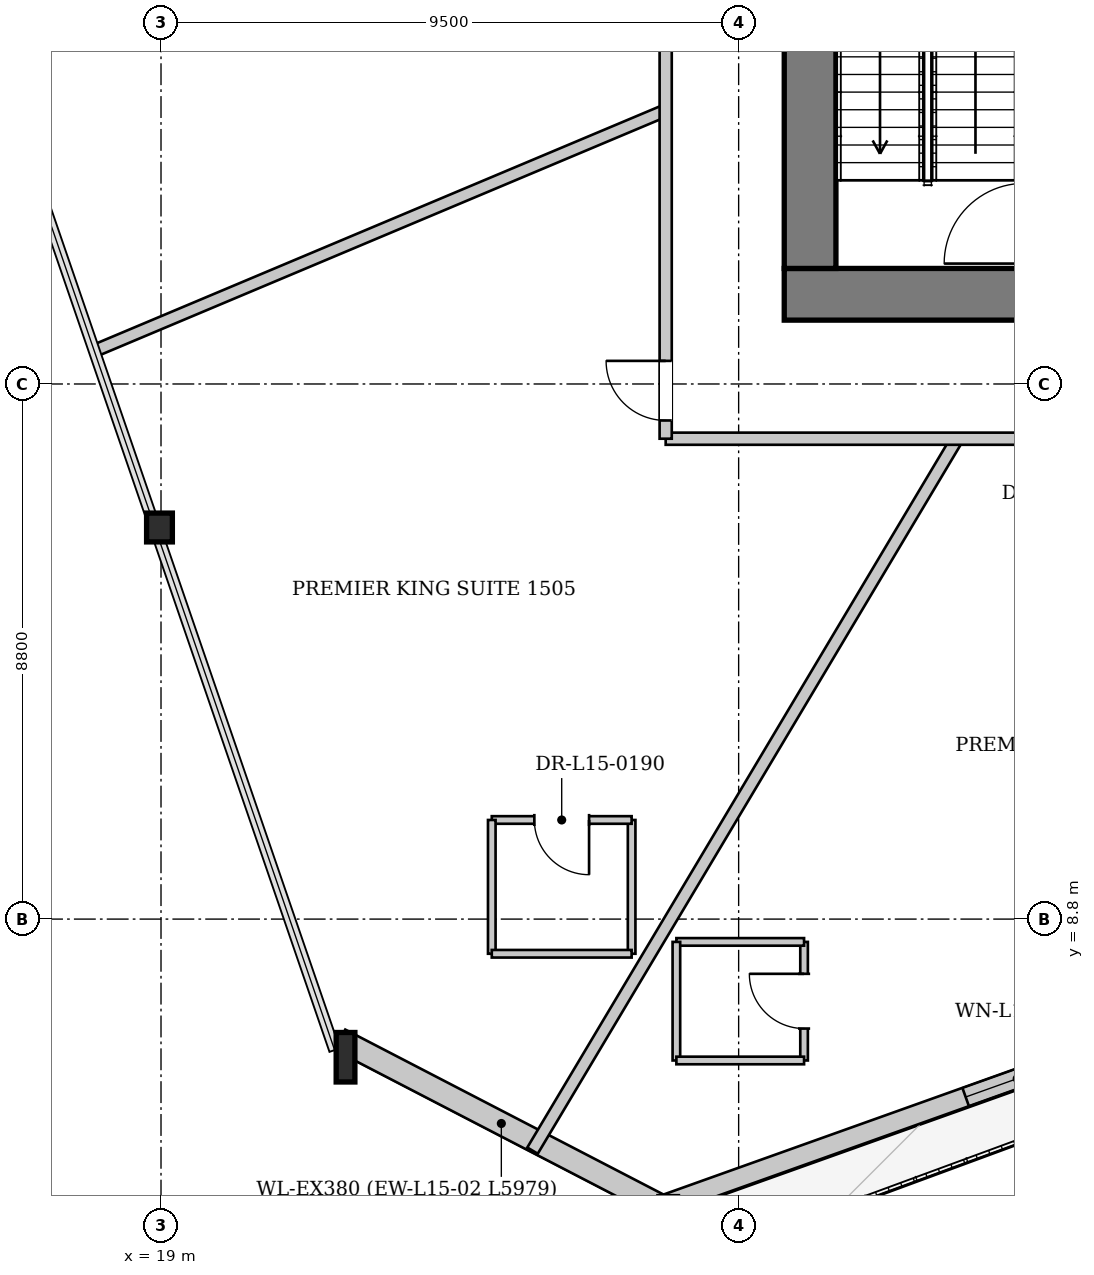
"""IFC4 building model, lengths in metres.
Left out: names, types, materials, properties, quantities, classifications, styles, units other than length and angle.
Written with IfcOpenShell. Run it as: python <this file> out.ifc"""

import sys

from ifc_helpers import new_model, si_unit, direction, frame, frame_2d, origin, origin_2d, place, context, subcontext, project, spatial, rectangle, i_section, extrude, source, transform, mapped, element, fill, save


model = new_model("IFC4")
c1 = context("Model", 3, precision=1e-05, world=origin(), true_north=direction((0.0, 1.0)))
c2 = subcontext(c1, "Body", "Model", "MODEL_VIEW")
j1 = project(units=[si_unit("LENGTHUNIT", "METRE"), si_unit("PLANEANGLEUNIT", "RADIAN")], contexts=[c1])
p1 = place(None, origin())
s1 = spatial("IfcSite", under=j1, at=p1, CompositionType="ELEMENT")
p2 = place(p1, origin())
s2 = spatial("IfcBuilding", under=s1, at=p2, CompositionType="ELEMENT")
p3 = place(p2, frame((0.0, 0.0, 61.25)))
s3 = spatial("IfcBuildingStorey", under=s2, at=p3, CompositionType="ELEMENT", Elevation=61.25)
m1 = source(origin(), c2, "Body", "SweptSolid", [
    extrude(i_section(OverallWidth=0.424, OverallDepth=0.474, WebThickness=0.043, FlangeThickness=0.068, at=origin_2d()), origin(), (0.0, 0.0, 1.0), 3.406),
])
p4 = place(p3, frame((18.852, 15.383, 0.0), z_axis=(0.072396399294, -0.083936815419, 0.993837699218), x_axis=(0.757244521665, 0.653131483247, 0.0)))
e1 = element("IfcColumn", 1, at=p4, inside=s3, PredefinedType="COLUMN", context=c2, shape_type="MappedRepresentation", body=[
    mapped(m1, transform((0.0, 0.0, 0.0), x_axis=(1.0, 0.0, 0.0), y_axis=(0.0, 1.0, 0.0), z_axis=(0.0, 0.0, 1.0), scale=1.0)),
])
m2 = source(origin(), c2, "Body", "SweptSolid", [
    extrude(i_section(OverallWidth=0.308, OverallDepth=0.814, WebThickness=0.021, FlangeThickness=0.04, at=origin_2d()), origin(), (0.0, 0.0, 1.0), 3.412),
])
p5 = place(p3, frame((21.856, 6.646, 0.0), z_axis=(0.104897816751, -0.068906273896, 0.992092925818), x_axis=(0.549029983711, 0.835802654331, 0.0)))
e2 = element("IfcColumn", 2, at=p5, inside=s3, PredefinedType="COLUMN", context=c2, shape_type="MappedRepresentation", body=[
    mapped(m2, transform((0.0, 0.0, 0.0), x_axis=(1.0, 0.0, 0.0), y_axis=(0.0, 1.0, 0.0), z_axis=(0.0, 0.0, 1.0), scale=1.0)),
])
p6 = place(p3, frame((50.076, 12.243, 0.0), z_axis=(0.0, 0.0, 1.0), x_axis=(-0.941799205237, -0.33617593164, 0.0)))
e3 = element("IfcWall", 3, at=p6, inside=s3, PredefinedType="SOLIDWALL", context=c2, shape_type="SweptSolid", body=[
    extrude(rectangle(XDim=24.385, YDim=0.32, at=frame_2d((12.193, 0.0))), origin(), (0.0, 0.0, 1.0), 2.592),
])
p7 = place(p6, frame((7.253, 0.0, 0.0)))
e4 = element("IfcOpeningElement", 4, at=p7, cuts=e3, PredefinedType="OPENING", context=c2, shape_type="SweptSolid", body=[
    extrude(rectangle(XDim=1.1, YDim=2.3, at=frame_2d((0.55, 1.15))), frame((0.0, 0.17, 0.0), z_axis=(0.0, -1.0, 0.0), x_axis=(1.0, 0.0, 0.0)), (0.0, 0.0, 1.0), 0.34),
])
p8 = place(p6, frame((17.145, 0.0, 0.272)))
e5 = element("IfcOpeningElement", 5, at=p8, cuts=e3, PredefinedType="OPENING", context=c2, shape_type="SweptSolid", body=[
    extrude(rectangle(XDim=1.8, YDim=2.2, at=frame_2d((0.9, 1.1))), frame((0.0, 0.17, 0.0), z_axis=(0.0, -1.0, 0.0), x_axis=(1.0, 0.0, 0.0)), (0.0, 0.0, 1.0), 0.34),
])
p9 = place(p3, frame((27.251, 4.063, 0.0), z_axis=(0.0, 0.0, 1.0), x_axis=(-0.887815090673, 0.46020035286, 0.0)))
e6 = element("IfcWall", 6, at=p9, inside=s3, PredefinedType="SOLIDWALL", context=c2, shape_type="SweptSolid", body=[
    extrude(rectangle(XDim=5.979, YDim=0.38, at=frame_2d((2.989, 0.0))), origin(), (0.0, 0.0, 1.0), 2.592),
])
p10 = place(p3, frame((46.75, 19.075, 0.0), z_axis=(0.0, 0.0, 1.0), x_axis=(-1.0, 0.0, 0.0)))
e7 = element("IfcWall", 7, at=p10, inside=s3, PredefinedType="SHEAR", context=c2, shape_type="SweptSolid", body=[
    extrude(rectangle(XDim=17.5, YDim=0.85, at=frame_2d((8.75, 0.0))), origin(), (0.0, 0.0, 1.0), 3.3),
])
p11 = place(p10, frame((4.95, 0.0, 0.0)))
e8 = element("IfcOpeningElement", 8, at=p11, cuts=e7, PredefinedType="OPENING", context=c2, shape_type="SweptSolid", body=[
    extrude(rectangle(XDim=1.12, YDim=2.25, at=frame_2d((0.56, 1.125))), frame((0.0, 0.435, 0.0), z_axis=(0.0, -1.0, 0.0), x_axis=(1.0, 0.0, 0.0)), (0.0, 0.0, 1.0), 0.87),
])
p12 = place(p10, frame((11.45, 0.0, 0.0)))
e9 = element("IfcOpeningElement", 9, at=p12, cuts=e7, PredefinedType="OPENING", context=c2, shape_type="SweptSolid", body=[
    extrude(rectangle(XDim=1.12, YDim=2.25, at=frame_2d((0.56, 1.125))), frame((0.0, 0.435, 0.0), z_axis=(0.0, -1.0, 0.0), x_axis=(1.0, 0.0, 0.0)), (0.0, 0.0, 1.0), 0.87),
])
p13 = place(p3, frame((29.675, 19.5, 0.0), z_axis=(0.0, 0.0, 1.0), x_axis=(0.0, 1.0, 0.0)))
e10 = element("IfcWall", 10, at=p13, inside=s3, PredefinedType="SHEAR", context=c2, shape_type="SweptSolid", body=[
    extrude(rectangle(XDim=14.2, YDim=0.85, at=frame_2d((7.1, 0.0))), origin(), (0.0, 0.0, 1.0), 3.3),
])
p14 = place(p13, frame((7.42, 0.0, 0.0)))
e11 = element("IfcOpeningElement", 11, at=p14, cuts=e10, PredefinedType="OPENING", context=c2, shape_type="SweptSolid", body=[
    extrude(rectangle(XDim=1.6, YDim=2.2, at=frame_2d((0.8, 1.1))), frame((0.0, 0.435, 0.0), z_axis=(0.0, -1.0, 0.0), x_axis=(1.0, 0.0, 0.0)), (0.0, 0.0, 1.0), 0.87),
])
p15 = place(p3, frame((27.3, 22.098, 0.0), z_axis=(0.0, 0.0, 1.0), x_axis=(-0.921738414134, -0.387812191543, 0.0)))
e12 = element("IfcWall", 12, at=p15, inside=s3, PredefinedType="PARTITIONING", context=c2, shape_type="SweptSolid", body=[
    extrude(rectangle(XDim=10.166, YDim=0.2, at=frame_2d((5.083, 0.0))), origin(), (0.0, 0.0, 1.0), 3.3),
])
p16 = place(p3, frame((32.094, 16.7, 0.0), z_axis=(0.0, 0.0, 1.0), x_axis=(-0.512323953294, -0.858792272253, 0.0)))
e13 = element("IfcWall", 13, at=p16, inside=s3, PredefinedType="PARTITIONING", context=c2, shape_type="SweptSolid", body=[
    extrude(rectangle(XDim=13.632, YDim=0.2, at=frame_2d((6.816, 0.0))), origin(), (0.0, 0.0, 1.0), 3.3),
])
p17 = place(p3, frame((26.74, 8.23, 0.0), z_axis=(0.0, 0.0, 1.0), x_axis=(0.0, 1.0, 0.0)))
e14 = element("IfcWall", 14, at=p17, inside=s3, PredefinedType="PARTITIONING", context=c2, shape_type="SweptSolid", body=[
    extrude(rectangle(XDim=2.2, YDim=0.125, at=frame_2d((1.1, 0.0))), origin(), (0.0, 0.0, 1.0), 3.3),
])
p18 = place(p3, frame((26.74, 10.43, 0.0), z_axis=(0.0, 0.0, 1.0), x_axis=(-1.0, 0.0, 0.0)))
e15 = element("IfcWall", 15, at=p18, inside=s3, PredefinedType="PARTITIONING", context=c2, shape_type="SweptSolid", body=[
    extrude(rectangle(XDim=2.3, YDim=0.125, at=frame_2d((1.15, 0.0))), origin(), (0.0, 0.0, 1.0), 3.3),
])
p19 = place(p18, frame((0.7, 0.0, 0.0)))
e16 = element("IfcOpeningElement", 16, at=p19, cuts=e15, PredefinedType="OPENING", context=c2, shape_type="SweptSolid", body=[
    extrude(rectangle(XDim=0.9, YDim=2.1, at=frame_2d((0.45, 1.05))), frame((0.0, 0.073, 0.0), z_axis=(0.0, -1.0, 0.0), x_axis=(1.0, 0.0, 0.0)), (0.0, 0.0, 1.0), 0.145),
])
p20 = place(p3, frame((24.44, 10.43, 0.0), z_axis=(0.0, 0.0, 1.0), x_axis=(0.0, -1.0, 0.0)))
e17 = element("IfcWall", 17, at=p20, inside=s3, PredefinedType="PARTITIONING", context=c2, shape_type="SweptSolid", body=[
    extrude(rectangle(XDim=2.2, YDim=0.125, at=frame_2d((1.1, 0.0))), origin(), (0.0, 0.0, 1.0), 3.3),
])
p21 = place(p3, frame((24.44, 8.23, 0.0), z_axis=(0.0, 0.0, 1.0), x_axis=(1.0, 0.0, 0.0)))
e18 = element("IfcWall", 18, at=p21, inside=s3, PredefinedType="PARTITIONING", context=c2, shape_type="SweptSolid", body=[
    extrude(rectangle(XDim=2.3, YDim=0.125, at=frame_2d((1.15, 0.0))), origin(), (0.0, 0.0, 1.0), 3.3),
])
p22 = place(p3, frame((29.576, 6.475, 0.0), z_axis=(0.0, 0.0, 1.0), x_axis=(0.0, 1.0, 0.0)))
e19 = element("IfcWall", 19, at=p22, inside=s3, PredefinedType="PARTITIONING", context=c2, shape_type="SweptSolid", body=[
    extrude(rectangle(XDim=1.95, YDim=0.125, at=frame_2d((0.975, 0.0))), origin(), (0.0, 0.0, 1.0), 2.795),
])
p23 = place(p22, frame((0.525, 0.0, 0.0)))
e20 = element("IfcOpeningElement", 20, at=p23, cuts=e19, PredefinedType="OPENING", context=c2, shape_type="SweptSolid", body=[
    extrude(rectangle(XDim=0.9, YDim=2.1, at=frame_2d((0.45, 1.05))), frame((0.0, 0.073, 0.0), z_axis=(0.0, -1.0, 0.0), x_axis=(1.0, 0.0, 0.0)), (0.0, 0.0, 1.0), 0.145),
])
p24 = place(p3, frame((29.576, 8.425, 0.0), z_axis=(0.0, 0.0, 1.0), x_axis=(-1.0, 0.0, 0.0)))
e21 = element("IfcWall", 21, at=p24, inside=s3, PredefinedType="PARTITIONING", context=c2, shape_type="SweptSolid", body=[
    extrude(rectangle(XDim=2.1, YDim=0.125, at=frame_2d((1.05, 0.0))), origin(), (0.0, 0.0, 1.0), 3.3),
])
p25 = place(p3, frame((27.476, 8.425, 0.0), z_axis=(0.0, 0.0, 1.0), x_axis=(0.0, -1.0, 0.0)))
e22 = element("IfcWall", 22, at=p25, inside=s3, PredefinedType="PARTITIONING", context=c2, shape_type="SweptSolid", body=[
    extrude(rectangle(XDim=1.95, YDim=0.125, at=frame_2d((0.975, 0.0))), origin(), (0.0, 0.0, 1.0), 3.3),
])
p26 = place(p3, frame((27.476, 6.475, 0.0), z_axis=(0.0, 0.0, 1.0), x_axis=(1.0, 0.0, 0.0)))
e23 = element("IfcWall", 23, at=p26, inside=s3, PredefinedType="PARTITIONING", context=c2, shape_type="SweptSolid", body=[
    extrude(rectangle(XDim=2.1, YDim=0.125, at=frame_2d((1.05, 0.0))), origin(), (0.0, 0.0, 1.0), 3.3),
])
p27 = place(p3, frame((27.3, 16.7, 0.0), z_axis=(0.0, 0.0, 1.0), x_axis=(1.0, 0.0, 0.0)))
e24 = element("IfcWall", 24, at=p27, inside=s3, PredefinedType="PARTITIONING", context=c2, shape_type="SweptSolid", body=[
    extrude(rectangle(XDim=21.4, YDim=0.2, at=frame_2d((10.7, 0.0))), origin(), (0.0, 0.0, 1.0), 3.3),
])
p28 = place(p27, frame((6.732, 0.0, 0.0)))
e25 = element("IfcOpeningElement", 25, at=p28, cuts=e24, PredefinedType="OPENING", context=c2, shape_type="SweptSolid", body=[
    extrude(rectangle(XDim=0.98, YDim=2.15, at=frame_2d((0.49, 1.075))), frame((0.0, 0.11, 0.0), z_axis=(0.0, -1.0, 0.0), x_axis=(1.0, 0.0, 0.0)), (0.0, 0.0, 1.0), 0.22),
])
p29 = place(p27, frame((17.714, 0.0, 0.0)))
e26 = element("IfcOpeningElement", 26, at=p29, cuts=e24, PredefinedType="OPENING", context=c2, shape_type="SweptSolid", body=[
    extrude(rectangle(XDim=0.98, YDim=2.15, at=frame_2d((0.49, 1.075))), frame((0.0, 0.11, 0.0), z_axis=(0.0, -1.0, 0.0), x_axis=(1.0, 0.0, 0.0)), (0.0, 0.0, 1.0), 0.22),
])
p30 = place(p3, frame((27.3, 16.7, 0.0), z_axis=(0.0, 0.0, 1.0), x_axis=(0.0, 1.0, 0.0)))
e27 = element("IfcWall", 27, at=p30, inside=s3, PredefinedType="PARTITIONING", context=c2, shape_type="SweptSolid", body=[
    extrude(rectangle(XDim=19.8, YDim=0.2, at=frame_2d((9.9, 0.0))), origin(), (0.0, 0.0, 1.0), 3.3),
])
p31 = place(p30, frame((18.52, 0.0, 0.0)))
e28 = element("IfcOpeningElement", 28, at=p31, cuts=e27, PredefinedType="OPENING", context=c2, shape_type="SweptSolid", body=[
    extrude(rectangle(XDim=0.98, YDim=2.15, at=frame_2d((0.49, 1.075))), frame((0.0, 0.11, 0.0), z_axis=(0.0, -1.0, 0.0), x_axis=(1.0, 0.0, 0.0)), (0.0, 0.0, 1.0), 0.22),
])
p32 = place(p30, frame((9.047, 0.0, 0.0)))
e29 = element("IfcOpeningElement", 29, at=p32, cuts=e27, PredefinedType="OPENING", context=c2, shape_type="SweptSolid", body=[
    extrude(rectangle(XDim=0.98, YDim=2.15, at=frame_2d((0.49, 1.075))), frame((0.0, 0.11, 0.0), z_axis=(0.0, -1.0, 0.0), x_axis=(1.0, 0.0, 0.0)), (0.0, 0.0, 1.0), 0.22),
])
p33 = place(p30, frame((0.3, 0.0, 0.0)))
e30 = element("IfcOpeningElement", 30, at=p33, cuts=e27, PredefinedType="OPENING", context=c2, shape_type="SweptSolid", body=[
    extrude(rectangle(XDim=0.98, YDim=2.15, at=frame_2d((0.49, 1.075))), frame((0.0, 0.11, 0.0), z_axis=(0.0, -1.0, 0.0), x_axis=(1.0, 0.0, 0.0)), (0.0, 0.0, 1.0), 0.22),
])
m3 = source(origin(), c2, "Body", "SweptSolid", [
    extrude(rectangle(XDim=1.8, YDim=2.2, at=frame_2d((0.9, 1.1))), frame((0.0, 0.03, 0.0), z_axis=(0.0, -1.0, 0.0), x_axis=(1.0, 0.0, 0.0)), (0.0, 0.0, 1.0), 0.06),
])
p34 = place(p8, origin())
e31 = element("IfcWindow", 31, at=p34, inside=s3, PartitioningType="SINGLE_PANEL", PredefinedType="WINDOW", context=c2, shape_type="MappedRepresentation", body=[
    mapped(m3, transform((0.0, 0.0, 0.0), x_axis=(1.0, 0.0, 0.0), y_axis=(0.0, 1.0, 0.0), z_axis=(0.0, 0.0, 1.0), scale=1.0)),
])
fill(e5, e31)
m4 = source(origin(), c2, "Body", "SweptSolid", [
    extrude(rectangle(XDim=0.9, YDim=2.1, at=frame_2d((0.45, 1.05))), frame((0.0, 0.025, 0.0), z_axis=(0.0, -1.0, 0.0), x_axis=(1.0, 0.0, 0.0)), (0.0, 0.0, 1.0), 0.05),
])
p35 = place(p19, origin())
e32 = element("IfcDoor", 32, at=p35, inside=s3, OperationType="SINGLE_SWING_LEFT", PredefinedType="DOOR", context=c2, shape_type="MappedRepresentation", body=[
    mapped(m4, transform((0.0, 0.0, 0.0), x_axis=(1.0, 0.0, 0.0), y_axis=(0.0, 1.0, 0.0), z_axis=(0.0, 0.0, 1.0), scale=1.0)),
])
fill(e16, e32)
p36 = place(p23, origin())
e33 = element("IfcDoor", 33, at=p36, inside=s3, OperationType="SINGLE_SWING_RIGHT", PredefinedType="DOOR", context=c2, shape_type="MappedRepresentation", body=[
    mapped(m4, transform((0.0, 0.0, 0.0), x_axis=(1.0, 0.0, 0.0), y_axis=(0.0, 1.0, 0.0), z_axis=(0.0, 0.0, 1.0), scale=1.0)),
])
fill(e20, e33)
m5 = source(origin(), c2, "Body", "SweptSolid", [
    extrude(rectangle(XDim=0.98, YDim=2.15, at=frame_2d((0.49, 1.075))), frame((0.0, 0.025, 0.0), z_axis=(0.0, -1.0, 0.0), x_axis=(1.0, 0.0, 0.0)), (0.0, 0.0, 1.0), 0.05),
])
p37 = place(p33, origin())
e34 = element("IfcDoor", 34, at=p37, inside=s3, OperationType="SINGLE_SWING_RIGHT", PredefinedType="DOOR", context=c2, shape_type="MappedRepresentation", body=[
    mapped(m5, transform((0.0, 0.0, 0.0), x_axis=(1.0, 0.0, 0.0), y_axis=(0.0, 1.0, 0.0), z_axis=(0.0, 0.0, 1.0), scale=1.0)),
])
fill(e30, e34)
save(model, sys.argv[1])
